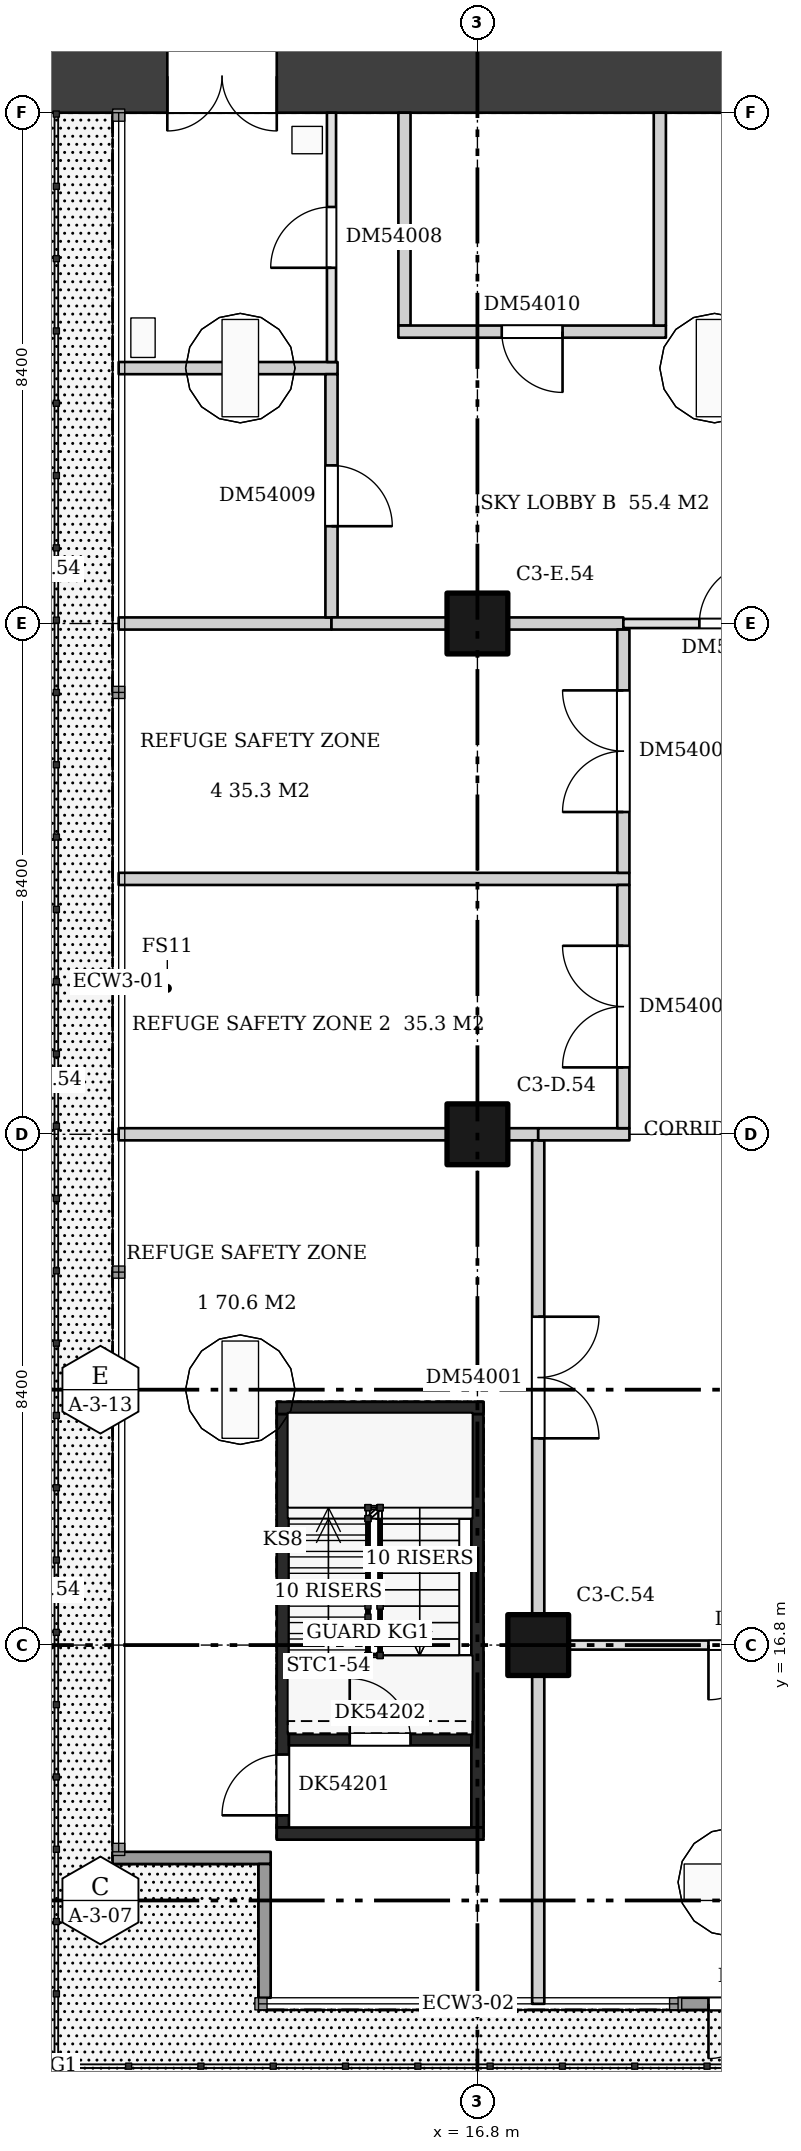
"""IFC4 building model, lengths in metres.
Left out: names, types, materials, properties, quantities, classifications, styles, units other than length and angle.
Written with IfcOpenShell. Run it as: python <this file> out.ifc"""

import sys

from ifc_helpers import new_model, si_unit, direction, frame, frame_2d, origin, origin_2d, place, context, subcontext, project, spatial, rectangle, extrude, element, fill, save


model = new_model("IFC4")
c1 = context("Model", 3, precision=1e-05, world=origin(), true_north=direction((0.0, 1.0)))
c2 = subcontext(c1, "Body", "Model", "MODEL_VIEW")
j1 = project(units=[si_unit("LENGTHUNIT", "METRE"), si_unit("PLANEANGLEUNIT", "RADIAN")], contexts=[c1])
p1 = place(None, origin())
s1 = spatial("IfcSite", under=j1, at=p1, CompositionType="ELEMENT")
p2 = place(p1, origin())
s2 = spatial("IfcBuilding", under=s1, at=p2, CompositionType="ELEMENT")
p3 = place(p2, frame((0.0, 0.0, 207.2)))
s3 = spatial("IfcBuildingStorey", under=s2, at=p3, CompositionType="ELEMENT", Elevation=207.2)
for number, where, z_axis, x_axis in (
    (1, (17.8, 16.8, 0.0), (0.0, 0.0, 1.0), (1.0, 0.0, 0.0)),
    (2, (16.8, 25.2, 0.0), (0.0, 0.0, 1.0), (1.0, 0.0, 0.0)),
    (3, (16.8, 33.6, 0.0), (0.0, 0.0, 1.0), (1.0, 0.0, 0.0)),
):
    element("IfcColumn", number, at=place(p3, frame(where, z_axis=z_axis, x_axis=x_axis)), inside=s3, PredefinedType="COLUMN", context=c2, shape_type="SweptSolid", body=[
        extrude(rectangle(XDim=1.0, YDim=1.0, at=origin_2d()), origin(), (0.0, 0.0, 1.0), 6.72),
    ])
p4 = place(p3, frame((9.6, 42.6, 0.0), z_axis=(0.0, 0.0, 1.0), x_axis=(1.0, 0.0, 0.0)))
e4 = element("IfcWall", 4, at=p4, inside=s3, PredefinedType="SHEAR", context=c2, shape_type="SweptSolid", body=[
    extrude(rectangle(XDim=14.4, YDim=1.2, at=frame_2d((7.2, 0.0))), origin(), (0.0, 0.0, 1.0), 6.72),
])
p5 = place(p4, frame((2.1, 0.0, 0.0)))
e5 = element("IfcOpeningElement", 5, at=p5, cuts=e4, PredefinedType="OPENING", context=c2, shape_type="SweptSolid", body=[
    extrude(rectangle(XDim=1.8, YDim=2.1, at=frame_2d((0.9, 1.05))), frame((0.0, 0.61, 0.0), z_axis=(0.0, -1.0, 0.0), x_axis=(1.0, 0.0, 0.0)), (0.0, 0.0, 1.0), 1.22),
])
p6 = place(p3, frame((13.6, 13.8, 0.0), z_axis=(0.0, 0.0, 1.0), x_axis=(0.0, 1.0, 0.0)))
e6 = element("IfcWall", 6, at=p6, inside=s3, PredefinedType="SHEAR", context=c2, shape_type="SweptSolid", body=[
    extrude(rectangle(XDim=6.8, YDim=0.2, at=frame_2d((3.4, 0.0))), origin(), (0.0, 0.0, 1.0), 6.72),
])
p7 = place(p6, frame((0.2, 0.0, 0.0)))
e7 = element("IfcOpeningElement", 7, at=p7, cuts=e6, PredefinedType="OPENING", context=c2, shape_type="SweptSolid", body=[
    extrude(rectangle(XDim=1.0, YDim=2.1, at=frame_2d((0.5, 1.05))), frame((0.0, 0.11, 0.0), z_axis=(0.0, -1.0, 0.0), x_axis=(1.0, 0.0, 0.0)), (0.0, 0.0, 1.0), 0.22),
])
p8 = place(p3, frame((16.8, 13.8, 0.0), z_axis=(0.0, 0.0, 1.0), x_axis=(0.0, 1.0, 0.0)))
e8 = element("IfcWall", 8, at=p8, inside=s3, PredefinedType="SHEAR", context=c2, shape_type="SweptSolid", body=[
    extrude(rectangle(XDim=6.8, YDim=0.2, at=frame_2d((3.4, 0.0))), origin(), (0.0, 0.0, 1.0), 6.72),
])
for number, where, z_axis, x_axis in (
    (9, (13.5, 13.7, 0.0), (0.0, 0.0, 1.0), (1.0, 0.0, 0.0)),
    (10, (13.5, 20.7, 0.0), (0.0, 0.0, 1.0), (1.0, 0.0, 0.0)),
):
    element("IfcWall", number, at=place(p3, frame(where, z_axis=z_axis, x_axis=x_axis)), inside=s3, PredefinedType="SHEAR", context=c2, shape_type="SweptSolid", body=[
        extrude(rectangle(XDim=3.4, YDim=0.2, at=frame_2d((1.7, 0.0))), origin(), (0.0, 0.0, 1.0), 6.72),
    ])
p9 = place(p3, frame((13.7, 15.25, 0.0), z_axis=(0.0, 0.0, 1.0), x_axis=(1.0, 0.0, 0.0)))
e11 = element("IfcWall", 11, at=p9, inside=s3, PredefinedType="SHEAR", context=c2, shape_type="SweptSolid", body=[
    extrude(rectangle(XDim=3.0, YDim=0.2, at=frame_2d((1.5, 0.0))), origin(), (0.0, 0.0, 1.0), 6.72),
])
p10 = place(p9, frame((1.0, 0.0, 0.0)))
e12 = element("IfcOpeningElement", 12, at=p10, cuts=e11, PredefinedType="OPENING", context=c2, shape_type="SweptSolid", body=[
    extrude(rectangle(XDim=1.0, YDim=2.1, at=frame_2d((0.5, 1.05))), frame((0.0, 0.11, 0.0), z_axis=(0.0, -1.0, 0.0), x_axis=(1.0, 0.0, 0.0)), (0.0, 0.0, 1.0), 0.22),
])
p11 = place(p3, frame((10.9, 25.2, 0.0), z_axis=(0.0, 0.0, 1.0), x_axis=(1.0, 0.0, 0.0)))
e13 = element("IfcWall", 13, at=p11, inside=s3, PredefinedType="PARTITIONING", context=c2, shape_type="SweptSolid", body=[
    extrude(rectangle(XDim=5.4, YDim=0.2, at=frame_2d((2.7, 0.0))), origin(), (0.0, 0.0, 1.0), 6.72),
])
p12 = place(p3, frame((17.3, 25.2, 0.0), z_axis=(0.0, 0.0, 1.0), x_axis=(1.0, 0.0, 0.0)))
e14 = element("IfcWall", 14, at=p12, inside=s3, PredefinedType="PARTITIONING", context=c2, shape_type="SweptSolid", body=[
    extrude(rectangle(XDim=0.5, YDim=0.2, at=frame_2d((0.25, 0.0))), origin(), (0.0, 0.0, 1.0), 6.72),
])
p13 = place(p3, frame((10.9, 29.4, 0.0), z_axis=(0.0, 0.0, 1.0), x_axis=(1.0, 0.0, 0.0)))
e15 = element("IfcWall", 15, at=p13, inside=s3, PredefinedType="PARTITIONING", context=c2, shape_type="SweptSolid", body=[
    extrude(rectangle(XDim=8.4, YDim=0.2, at=frame_2d((4.2, 0.0))), origin(), (0.0, 0.0, 1.0), 6.72),
])
p14 = place(p3, frame((10.9, 33.6, 0.0), z_axis=(0.0, 0.0, 1.0), x_axis=(1.0, 0.0, 0.0)))
e16 = element("IfcWall", 16, at=p14, inside=s3, PredefinedType="PARTITIONING", context=c2, shape_type="SweptSolid", body=[
    extrude(rectangle(XDim=3.5, YDim=0.2, at=frame_2d((1.75, 0.0))), origin(), (0.0, 0.0, 1.0), 6.72),
])
p15 = place(p3, frame((10.9, 37.8, 0.0), z_axis=(0.0, 0.0, 1.0), x_axis=(1.0, 0.0, 0.0)))
e17 = element("IfcWall", 17, at=p15, inside=s3, PredefinedType="PARTITIONING", context=c2, shape_type="SweptSolid", body=[
    extrude(rectangle(XDim=3.6, YDim=0.2, at=frame_2d((1.8, 0.0))), origin(), (0.0, 0.0, 1.0), 6.72),
])
p16 = place(p3, frame((14.4, 33.7, 0.0), z_axis=(0.0, 0.0, 1.0), x_axis=(0.0, 1.0, 0.0)))
e18 = element("IfcWall", 18, at=p16, inside=s3, PredefinedType="PARTITIONING", context=c2, shape_type="SweptSolid", body=[
    extrude(rectangle(XDim=4.0, YDim=0.2, at=frame_2d((2.0, 0.0))), origin(), (0.0, 0.0, 1.0), 6.72),
])
p17 = place(p16, frame((1.5, 0.0, 0.0)))
e19 = element("IfcOpeningElement", 19, at=p17, cuts=e18, PredefinedType="OPENING", context=c2, shape_type="SweptSolid", body=[
    extrude(rectangle(XDim=1.0, YDim=2.1, at=frame_2d((0.5, 1.05))), frame((0.0, 0.11, 0.0), z_axis=(0.0, -1.0, 0.0), x_axis=(1.0, 0.0, 0.0)), (0.0, 0.0, 1.0), 0.22),
])
p18 = place(p3, frame((14.4, 33.6, 0.0), z_axis=(0.0, 0.0, 1.0), x_axis=(1.0, 0.0, 0.0)))
e20 = element("IfcWall", 20, at=p18, inside=s3, PredefinedType="PARTITIONING", context=c2, shape_type="SweptSolid", body=[
    extrude(rectangle(XDim=1.9, YDim=0.2, at=frame_2d((0.95, 0.0))), origin(), (0.0, 0.0, 1.0), 6.72),
])
p19 = place(p3, frame((17.3, 33.6, 0.0), z_axis=(0.0, 0.0, 1.0), x_axis=(1.0, 0.0, 0.0)))
e21 = element("IfcWall", 21, at=p19, inside=s3, PredefinedType="PARTITIONING", context=c2, shape_type="SweptSolid", body=[
    extrude(rectangle(XDim=1.9, YDim=0.2, at=frame_2d((0.95, 0.0))), origin(), (0.0, 0.0, 1.0), 6.72),
])
p20 = place(p3, frame((14.4, 37.9, 0.0), z_axis=(0.0, 0.0, 1.0), x_axis=(0.0, 1.0, 0.0)))
e22 = element("IfcWall", 22, at=p20, inside=s3, PredefinedType="PARTITIONING", context=c2, shape_type="SweptSolid", body=[
    extrude(rectangle(XDim=4.1, YDim=0.15, at=frame_2d((2.05, 0.0))), origin(), (0.0, 0.0, 1.0), 6.72),
])
p21 = place(p20, frame((1.55, 0.0, 0.0)))
e23 = element("IfcOpeningElement", 23, at=p21, cuts=e22, PredefinedType="OPENING", context=c2, shape_type="SweptSolid", body=[
    extrude(rectangle(XDim=1.0, YDim=2.1, at=frame_2d((0.5, 1.05))), frame((0.0, 0.085, 0.0), z_axis=(0.0, -1.0, 0.0), x_axis=(1.0, 0.0, 0.0)), (0.0, 0.0, 1.0), 0.17),
])
p22 = place(p3, frame((15.6, 38.5, 0.0), z_axis=(0.0, 0.0, 1.0), x_axis=(0.0, 1.0, 0.0)))
e24 = element("IfcWall", 24, at=p22, inside=s3, PredefinedType="PARTITIONING", context=c2, shape_type="SweptSolid", body=[
    extrude(rectangle(XDim=3.5, YDim=0.2, at=frame_2d((1.75, 0.0))), origin(), (0.0, 0.0, 1.0), 6.72),
])
p23 = place(p3, frame((15.5, 38.4, 0.0), z_axis=(0.0, 0.0, 1.0), x_axis=(1.0, 0.0, 0.0)))
e25 = element("IfcWall", 25, at=p23, inside=s3, PredefinedType="PARTITIONING", context=c2, shape_type="SweptSolid", body=[
    extrude(rectangle(XDim=4.4, YDim=0.2, at=frame_2d((2.2, 0.0))), origin(), (0.0, 0.0, 1.0), 6.72),
])
p24 = place(p23, frame((1.7, 0.0, 0.0)))
e26 = element("IfcOpeningElement", 26, at=p24, cuts=e25, PredefinedType="OPENING", context=c2, shape_type="SweptSolid", body=[
    extrude(rectangle(XDim=1.0, YDim=2.1, at=frame_2d((0.5, 1.05))), frame((0.0, 0.11, 0.0), z_axis=(0.0, -1.0, 0.0), x_axis=(1.0, 0.0, 0.0)), (0.0, 0.0, 1.0), 0.22),
])
p25 = place(p3, frame((17.8, 10.9, 0.0), z_axis=(0.0, 0.0, 1.0), x_axis=(0.0, 1.0, 0.0)))
e27 = element("IfcWall", 27, at=p25, inside=s3, PredefinedType="PARTITIONING", context=c2, shape_type="SweptSolid", body=[
    extrude(rectangle(XDim=5.4, YDim=0.2, at=frame_2d((2.7, 0.0))), origin(), (0.0, 0.0, 1.0), 6.72),
])
p26 = place(p3, frame((17.8, 17.3, 0.0), z_axis=(0.0, 0.0, 1.0), x_axis=(0.0, 1.0, 0.0)))
e28 = element("IfcWall", 28, at=p26, inside=s3, PredefinedType="PARTITIONING", context=c2, shape_type="SweptSolid", body=[
    extrude(rectangle(XDim=7.8, YDim=0.2, at=frame_2d((3.9, 0.0))), origin(), (0.0, 0.0, 1.0), 6.72),
])
p27 = place(p26, frame((2.9, 0.0, 0.0)))
e29 = element("IfcOpeningElement", 29, at=p27, cuts=e28, PredefinedType="OPENING", context=c2, shape_type="SweptSolid", body=[
    extrude(rectangle(XDim=2.0, YDim=2.1, at=frame_2d((1.0, 1.05))), frame((0.0, 0.11, 0.0), z_axis=(0.0, -1.0, 0.0), x_axis=(1.0, 0.0, 0.0)), (0.0, 0.0, 1.0), 0.22),
])
p28 = place(p3, frame((18.3, 16.8, 0.0), z_axis=(0.0, 0.0, 1.0), x_axis=(1.0, 0.0, 0.0)))
e30 = element("IfcWall", 30, at=p28, inside=s3, PredefinedType="PARTITIONING", context=c2, shape_type="SweptSolid", body=[
    extrude(rectangle(XDim=6.4, YDim=0.15, at=frame_2d((3.2, 0.0))), origin(), (0.0, 0.0, 1.0), 6.72),
])
p29 = place(p28, frame((2.3, 0.0, 0.0)))
e31 = element("IfcOpeningElement", 31, at=p29, cuts=e30, PredefinedType="OPENING", context=c2, shape_type="SweptSolid", body=[
    extrude(rectangle(XDim=1.8, YDim=2.1, at=frame_2d((0.9, 1.05))), frame((0.0, 0.085, 0.0), z_axis=(0.0, -1.0, 0.0), x_axis=(1.0, 0.0, 0.0)), (0.0, 0.0, 1.0), 0.17),
])
p30 = place(p3, frame((17.8, 25.2, 0.0), z_axis=(0.0, 0.0, 1.0), x_axis=(1.0, 0.0, 0.0)))
e32 = element("IfcWall", 32, at=p30, inside=s3, PredefinedType="PARTITIONING", context=c2, shape_type="SweptSolid", body=[
    extrude(rectangle(XDim=1.5, YDim=0.2, at=frame_2d((0.75, 0.0))), origin(), (0.0, 0.0, 1.0), 6.72),
])
p31 = place(p3, frame((19.2, 25.3, 0.0), z_axis=(0.0, 0.0, 1.0), x_axis=(0.0, 1.0, 0.0)))
e33 = element("IfcWall", 33, at=p31, inside=s3, PredefinedType="PARTITIONING", context=c2, shape_type="SweptSolid", body=[
    extrude(rectangle(XDim=4.0, YDim=0.2, at=frame_2d((2.0, 0.0))), origin(), (0.0, 0.0, 1.0), 6.72),
])
p32 = place(p31, frame((1.0, 0.0, 0.0)))
e34 = element("IfcOpeningElement", 34, at=p32, cuts=e33, PredefinedType="OPENING", context=c2, shape_type="SweptSolid", body=[
    extrude(rectangle(XDim=2.0, YDim=2.1, at=frame_2d((1.0, 1.05))), frame((0.0, 0.11, 0.0), z_axis=(0.0, -1.0, 0.0), x_axis=(1.0, 0.0, 0.0)), (0.0, 0.0, 1.0), 0.22),
])
p33 = place(p3, frame((19.2, 29.5, 0.0), z_axis=(0.0, 0.0, 1.0), x_axis=(0.0, 1.0, 0.0)))
e35 = element("IfcWall", 35, at=p33, inside=s3, PredefinedType="PARTITIONING", context=c2, shape_type="SweptSolid", body=[
    extrude(rectangle(XDim=4.0, YDim=0.2, at=frame_2d((2.0, 0.0))), origin(), (0.0, 0.0, 1.0), 6.72),
])
p34 = place(p33, frame((1.0, 0.0, 0.0)))
e36 = element("IfcOpeningElement", 36, at=p34, cuts=e35, PredefinedType="OPENING", context=c2, shape_type="SweptSolid", body=[
    extrude(rectangle(XDim=2.0, YDim=2.1, at=frame_2d((1.0, 1.05))), frame((0.0, 0.11, 0.0), z_axis=(0.0, -1.0, 0.0), x_axis=(1.0, 0.0, 0.0)), (0.0, 0.0, 1.0), 0.22),
])
p35 = place(p3, frame((19.2, 33.6, 0.0), z_axis=(0.0, 0.0, 1.0), x_axis=(1.0, 0.0, 0.0)))
e37 = element("IfcWall", 37, at=p35, inside=s3, PredefinedType="PARTITIONING", context=c2, shape_type="SweptSolid", body=[
    extrude(rectangle(XDim=3.5, YDim=0.15, at=frame_2d((1.75, 0.0))), origin(), (0.0, 0.0, 1.0), 6.72),
])
p36 = place(p35, frame((1.25, 0.0, 0.0)))
e38 = element("IfcOpeningElement", 38, at=p36, cuts=e37, PredefinedType="OPENING", context=c2, shape_type="SweptSolid", body=[
    extrude(rectangle(XDim=1.0, YDim=2.1, at=frame_2d((0.5, 1.05))), frame((0.0, 0.085, 0.0), z_axis=(0.0, -1.0, 0.0), x_axis=(1.0, 0.0, 0.0)), (0.0, 0.0, 1.0), 0.17),
])
p37 = place(p3, frame((19.8, 38.5, 0.0), z_axis=(0.0, 0.0, 1.0), x_axis=(0.0, 1.0, 0.0)))
e39 = element("IfcWall", 39, at=p37, inside=s3, PredefinedType="PARTITIONING", context=c2, shape_type="SweptSolid", body=[
    extrude(rectangle(XDim=3.5, YDim=0.2, at=frame_2d((1.75, 0.0))), origin(), (0.0, 0.0, 1.0), 6.72),
])
p38 = place(p3, frame((10.8, 13.3, 0.0), z_axis=(0.0, 0.0, 1.0), x_axis=(1.0, 0.0, 0.0)))
e40 = element("IfcWall", 40, at=p38, inside=s3, PredefinedType="SOLIDWALL", context=c2, shape_type="SweptSolid", body=[
    extrude(rectangle(XDim=2.6, YDim=0.2, at=frame_2d((1.3, 0.0))), origin(), (0.0, 0.0, 1.0), 6.72),
])
p39 = place(p3, frame((13.3, 13.2, 0.0), z_axis=(0.0, 0.0, 1.0), x_axis=(0.0, -1.0, 0.0)))
e41 = element("IfcWall", 41, at=p39, inside=s3, PredefinedType="SOLIDWALL", context=c2, shape_type="SweptSolid", body=[
    extrude(rectangle(XDim=2.2, YDim=0.2, at=frame_2d((1.1, 0.0))), origin(), (0.0, 0.0, 1.0), 6.72),
])
p40 = place(p3, frame((20.1, 10.9, 0.0), z_axis=(0.0, 0.0, 1.0), x_axis=(1.0, 0.0, 0.0)))
e42 = element("IfcWall", 42, at=p40, inside=s3, PredefinedType="SOLIDWALL", context=c2, shape_type="SweptSolid", body=[
    extrude(rectangle(XDim=2.8, YDim=0.2, at=frame_2d((1.4, 0.0))), origin(), (0.0, 0.0, 1.0), 6.72),
])
p41 = place(p40, frame((0.5, 0.0, 0.0)))
e43 = element("IfcOpeningElement", 43, at=p41, cuts=e42, PredefinedType="OPENING", context=c2, shape_type="SweptSolid", body=[
    extrude(rectangle(XDim=1.8, YDim=2.4, at=frame_2d((0.9, 1.2))), frame((0.0, 0.11, 0.0), z_axis=(0.0, -1.0, 0.0), x_axis=(1.0, 0.0, 0.0)), (0.0, 0.0, 1.0), 0.22),
])
p42 = place(p5, frame((1.8, 0.0, 0.0), z_axis=(0.0, 0.0, 1.0), x_axis=(-1.0, 0.0, 0.0)))
e44 = element("IfcDoor", 44, at=p42, inside=s3, OperationType="DOUBLE_DOOR_SINGLE_SWING", PredefinedType="DOOR", context=c2, shape_type="SweptSolid", body=[
    extrude(rectangle(XDim=1.8, YDim=2.1, at=frame_2d((0.9, 1.05))), frame((0.0, 0.025, 0.0), z_axis=(0.0, -1.0, 0.0), x_axis=(1.0, 0.0, 0.0)), (0.0, 0.0, 1.0), 0.05),
])
fill(e5, e44)
p43 = place(p7, origin())
e45 = element("IfcDoor", 45, at=p43, inside=s3, OperationType="SINGLE_SWING_LEFT", PredefinedType="DOOR", context=c2, shape_type="SweptSolid", body=[
    extrude(rectangle(XDim=1.0, YDim=2.1, at=frame_2d((0.5, 1.05))), frame((0.0, 0.025, 0.0), z_axis=(0.0, -1.0, 0.0), x_axis=(1.0, 0.0, 0.0)), (0.0, 0.0, 1.0), 0.05),
])
fill(e7, e45)
p44 = place(p10, origin())
e46 = element("IfcDoor", 46, at=p44, inside=s3, OperationType="SINGLE_SWING_LEFT", PredefinedType="DOOR", context=c2, shape_type="SweptSolid", body=[
    extrude(rectangle(XDim=1.0, YDim=2.1, at=frame_2d((0.5, 1.05))), frame((0.0, 0.025, 0.0), z_axis=(0.0, -1.0, 0.0), x_axis=(1.0, 0.0, 0.0)), (0.0, 0.0, 1.0), 0.05),
])
fill(e12, e46)
p45 = place(p27, frame((2.0, 0.0, 0.0), z_axis=(0.0, 0.0, 1.0), x_axis=(-1.0, 0.0, 0.0)))
e47 = element("IfcDoor", 47, at=p45, inside=s3, OperationType="DOUBLE_DOOR_SINGLE_SWING", PredefinedType="DOOR", context=c2, shape_type="SweptSolid", body=[
    extrude(rectangle(XDim=2.0, YDim=2.1, at=frame_2d((1.0, 1.05))), frame((0.0, 0.025, 0.0), z_axis=(0.0, -1.0, 0.0), x_axis=(1.0, 0.0, 0.0)), (0.0, 0.0, 1.0), 0.05),
])
fill(e29, e47)
p46 = place(p29, frame((1.8, 0.0, 0.0), z_axis=(0.0, 0.0, 1.0), x_axis=(-1.0, 0.0, 0.0)))
e48 = element("IfcDoor", 48, at=p46, inside=s3, OperationType="DOUBLE_DOOR_SINGLE_SWING", PredefinedType="DOOR", context=c2, shape_type="SweptSolid", body=[
    extrude(rectangle(XDim=1.8, YDim=2.1, at=frame_2d((0.9, 1.05))), frame((0.0, 0.025, 0.0), z_axis=(0.0, -1.0, 0.0), x_axis=(1.0, 0.0, 0.0)), (0.0, 0.0, 1.0), 0.05),
])
fill(e31, e48)
p47 = place(p32, origin())
e49 = element("IfcDoor", 49, at=p47, inside=s3, OperationType="DOUBLE_DOOR_SINGLE_SWING", PredefinedType="DOOR", context=c2, shape_type="SweptSolid", body=[
    extrude(rectangle(XDim=2.0, YDim=2.1, at=frame_2d((1.0, 1.05))), frame((0.0, 0.025, 0.0), z_axis=(0.0, -1.0, 0.0), x_axis=(1.0, 0.0, 0.0)), (0.0, 0.0, 1.0), 0.05),
])
fill(e34, e49)
p48 = place(p34, origin())
e50 = element("IfcDoor", 50, at=p48, inside=s3, OperationType="DOUBLE_DOOR_SINGLE_SWING", PredefinedType="DOOR", context=c2, shape_type="SweptSolid", body=[
    extrude(rectangle(XDim=2.0, YDim=2.1, at=frame_2d((1.0, 1.05))), frame((0.0, 0.025, 0.0), z_axis=(0.0, -1.0, 0.0), x_axis=(1.0, 0.0, 0.0)), (0.0, 0.0, 1.0), 0.05),
])
fill(e36, e50)
p49 = place(p21, origin())
e51 = element("IfcDoor", 51, at=p49, inside=s3, OperationType="SINGLE_SWING_LEFT", PredefinedType="DOOR", context=c2, shape_type="SweptSolid", body=[
    extrude(rectangle(XDim=1.0, YDim=2.1, at=frame_2d((0.5, 1.05))), frame((0.0, 0.025, 0.0), z_axis=(0.0, -1.0, 0.0), x_axis=(1.0, 0.0, 0.0)), (0.0, 0.0, 1.0), 0.05),
])
fill(e23, e51)
p50 = place(p17, frame((1.0, 0.0, 0.0), z_axis=(0.0, 0.0, 1.0), x_axis=(-1.0, 0.0, 0.0)))
e52 = element("IfcDoor", 52, at=p50, inside=s3, OperationType="SINGLE_SWING_RIGHT", PredefinedType="DOOR", context=c2, shape_type="SweptSolid", body=[
    extrude(rectangle(XDim=1.0, YDim=2.1, at=frame_2d((0.5, 1.05))), frame((0.0, 0.025, 0.0), z_axis=(0.0, -1.0, 0.0), x_axis=(1.0, 0.0, 0.0)), (0.0, 0.0, 1.0), 0.05),
])
fill(e19, e52)
p51 = place(p24, frame((1.0, 0.0, 0.0), z_axis=(0.0, 0.0, 1.0), x_axis=(-1.0, 0.0, 0.0)))
e53 = element("IfcDoor", 53, at=p51, inside=s3, OperationType="SINGLE_SWING_LEFT", PredefinedType="DOOR", context=c2, shape_type="SweptSolid", body=[
    extrude(rectangle(XDim=1.0, YDim=2.1, at=frame_2d((0.5, 1.05))), frame((0.0, 0.025, 0.0), z_axis=(0.0, -1.0, 0.0), x_axis=(1.0, 0.0, 0.0)), (0.0, 0.0, 1.0), 0.05),
])
fill(e26, e53)
p52 = place(p36, origin())
e54 = element("IfcDoor", 54, at=p52, inside=s3, OperationType="SINGLE_SWING_RIGHT", PredefinedType="DOOR", context=c2, shape_type="SweptSolid", body=[
    extrude(rectangle(XDim=1.0, YDim=2.1, at=frame_2d((0.5, 1.05))), frame((0.0, 0.025, 0.0), z_axis=(0.0, -1.0, 0.0), x_axis=(1.0, 0.0, 0.0)), (0.0, 0.0, 1.0), 0.05),
])
fill(e38, e54)
p53 = place(p41, frame((1.8, 0.0, 0.0), z_axis=(0.0, 0.0, 1.0), x_axis=(-1.0, 0.0, 0.0)))
e55 = element("IfcDoor", 55, at=p53, inside=s3, OperationType="DOUBLE_DOOR_SINGLE_SWING", PredefinedType="DOOR", context=c2, shape_type="SweptSolid", body=[
    extrude(rectangle(XDim=1.8, YDim=2.4, at=frame_2d((0.9, 1.2))), frame((0.0, 0.025, 0.0), z_axis=(0.0, -1.0, 0.0), x_axis=(1.0, 0.0, 0.0)), (0.0, 0.0, 1.0), 0.05),
])
fill(e43, e55)
save(model, sys.argv[1])
